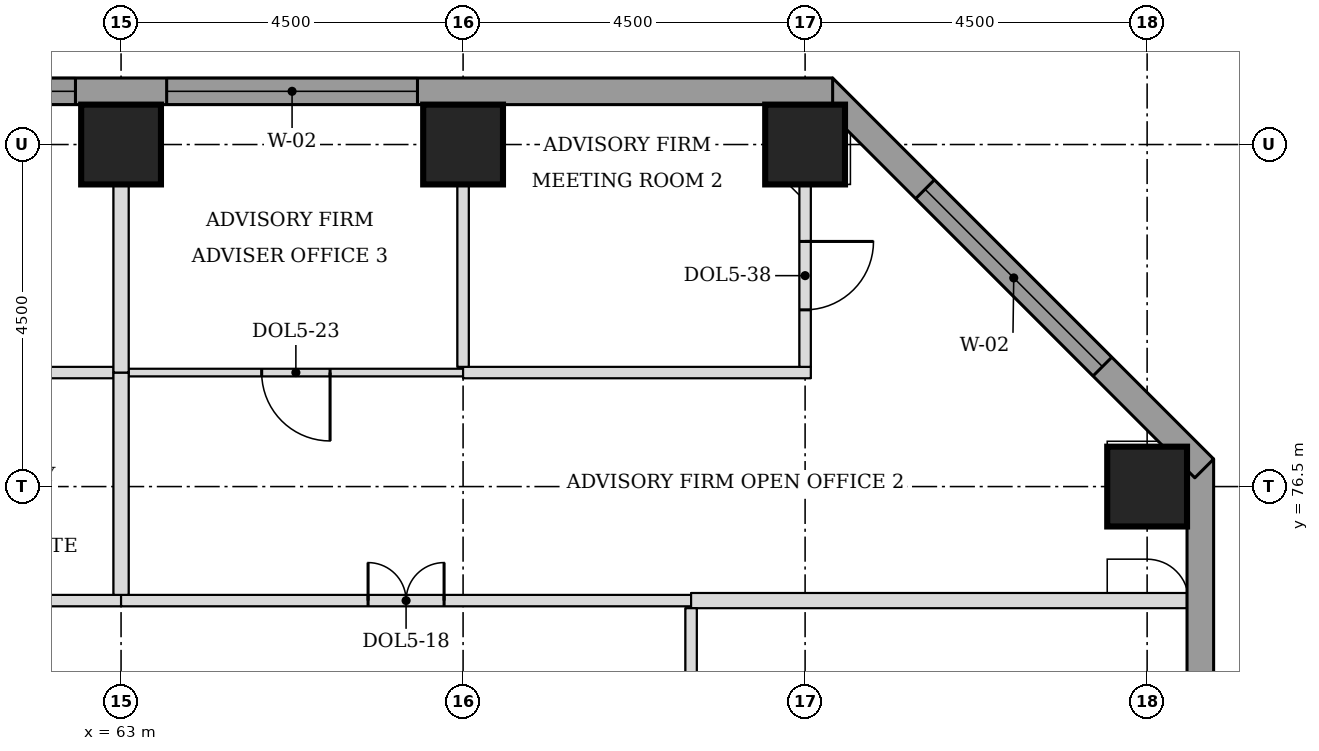
"""IFC4 building model, lengths in metres.
Left out: names, types, materials, properties, quantities, classifications, styles, units other than length and angle.
Written with IfcOpenShell. Run it as: python <this file> out.ifc"""

import sys

from ifc_helpers import new_model, si_unit, direction, frame, frame_2d, origin, origin_2d, place, context, subcontext, project, spatial, rectangle, extrude, element, fill, save


model = new_model("IFC4")
c1 = context("Model", 3, precision=1e-05, world=origin(), true_north=direction((0.0, 1.0)))
c2 = subcontext(c1, "Body", "Model", "MODEL_VIEW")
j1 = project(units=[si_unit("LENGTHUNIT", "METRE"), si_unit("PLANEANGLEUNIT", "RADIAN")], contexts=[c1])
p1 = place(None, origin())
s1 = spatial("IfcSite", under=j1, at=p1, CompositionType="ELEMENT")
p2 = place(p1, origin())
s2 = spatial("IfcBuilding", under=s1, at=p2, CompositionType="ELEMENT")
p3 = place(p2, frame((0.0, 0.0, 108.5)))
s3 = spatial("IfcBuildingStorey", under=s2, at=p3, CompositionType="ELEMENT", Elevation=108.5)
for number, where, z_axis, x_axis in (
    (1, (76.5, 76.5, 0.0), (0.0, 0.0, 1.0), (1.0, 0.0, 0.0)),
    (2, (63.0, 81.0, 0.0), (0.0, 0.0, 1.0), (1.0, 0.0, 0.0)),
    (3, (67.5, 81.0, 0.0), (0.0, 0.0, 1.0), (1.0, 0.0, 0.0)),
    (4, (72.0, 81.0, 0.0), (0.0, 0.0, 1.0), (1.0, 0.0, 0.0)),
):
    element("IfcColumn", number, at=place(p3, frame(where, z_axis=z_axis, x_axis=x_axis)), inside=s3, PredefinedType="COLUMN", context=c2, shape_type="SweptSolid", body=[
        extrude(rectangle(XDim=1.05, YDim=1.05, at=origin_2d()), origin(), (0.0, 0.0, 1.0), 3.7),
    ])
p4 = place(p3, frame((77.2, 44.638, 0.0), z_axis=(0.0, 0.0, 1.0), x_axis=(0.0, 1.0, 0.0)))
e5 = element("IfcWall", 5, at=p4, inside=s3, PredefinedType="STANDARD", context=c2, shape_type="SweptSolid", body=[
    extrude(rectangle(XDim=32.225, YDim=0.35, at=frame_2d((16.112, 0.0))), origin(), (0.0, 0.0, 1.0), 3.525),
])
p5 = place(p4, frame((5.462, 0.0, 0.9)))
e6 = element("IfcOpeningElement", 6, at=p5, cuts=e5, PredefinedType="OPENING", context=c2, shape_type="SweptSolid", body=[
    extrude(rectangle(XDim=3.3, YDim=1.9, at=frame_2d((1.65, 0.95))), frame((0.0, 0.185, 0.0), z_axis=(0.0, -1.0, 0.0), x_axis=(1.0, 0.0, 0.0)), (0.0, 0.0, 1.0), 0.37),
])
p6 = place(p4, frame((9.962, 0.0, 0.9)))
e7 = element("IfcOpeningElement", 7, at=p6, cuts=e5, PredefinedType="OPENING", context=c2, shape_type="SweptSolid", body=[
    extrude(rectangle(XDim=3.3, YDim=1.9, at=frame_2d((1.65, 0.95))), frame((0.0, 0.185, 0.0), z_axis=(0.0, -1.0, 0.0), x_axis=(1.0, 0.0, 0.0)), (0.0, 0.0, 1.0), 0.37),
])
p7 = place(p4, frame((14.462, 0.0, 0.9)))
e8 = element("IfcOpeningElement", 8, at=p7, cuts=e5, PredefinedType="OPENING", context=c2, shape_type="SweptSolid", body=[
    extrude(rectangle(XDim=3.3, YDim=1.9, at=frame_2d((1.65, 0.95))), frame((0.0, 0.185, 0.0), z_axis=(0.0, -1.0, 0.0), x_axis=(1.0, 0.0, 0.0)), (0.0, 0.0, 1.0), 0.37),
])
p8 = place(p4, frame((18.962, 0.0, 0.9)))
e9 = element("IfcOpeningElement", 9, at=p8, cuts=e5, PredefinedType="OPENING", context=c2, shape_type="SweptSolid", body=[
    extrude(rectangle(XDim=3.3, YDim=1.9, at=frame_2d((1.65, 0.95))), frame((0.0, 0.185, 0.0), z_axis=(0.0, -1.0, 0.0), x_axis=(1.0, 0.0, 0.0)), (0.0, 0.0, 1.0), 0.37),
])
p9 = place(p4, frame((23.462, 0.0, 0.9)))
e10 = element("IfcOpeningElement", 10, at=p9, cuts=e5, PredefinedType="OPENING", context=c2, shape_type="SweptSolid", body=[
    extrude(rectangle(XDim=3.3, YDim=1.9, at=frame_2d((1.65, 0.95))), frame((0.0, 0.185, 0.0), z_axis=(0.0, -1.0, 0.0), x_axis=(1.0, 0.0, 0.0)), (0.0, 0.0, 1.0), 0.37),
])
p10 = place(p3, frame((77.251, 76.739, 0.0), z_axis=(0.0, 0.0, 1.0), x_axis=(-0.707106781187, 0.707106781187, 0.0)))
e11 = element("IfcWall", 11, at=p10, inside=s3, PredefinedType="STANDARD", context=c2, shape_type="SweptSolid", body=[
    extrude(rectangle(XDim=7.089, YDim=0.35, at=frame_2d((3.544, 0.0))), origin(), (0.0, 0.0, 1.0), 3.525),
])
p11 = place(p10, frame((1.894, 0.0, 0.9)))
e12 = element("IfcOpeningElement", 12, at=p11, cuts=e11, PredefinedType="OPENING", context=c2, shape_type="SweptSolid", body=[
    extrude(rectangle(XDim=3.3, YDim=1.9, at=frame_2d((1.65, 0.95))), frame((0.0, 0.185, 0.0), z_axis=(0.0, -1.0, 0.0), x_axis=(1.0, 0.0, 0.0)), (0.0, 0.0, 1.0), 0.37),
])
p12 = place(p3, frame((72.362, 81.7, 0.0), z_axis=(0.0, 0.0, 1.0), x_axis=(-1.0, 0.0, 0.0)))
e13 = element("IfcWall", 13, at=p12, inside=s3, PredefinedType="STANDARD", context=c2, shape_type="SweptSolid", body=[
    extrude(rectangle(XDim=32.225, YDim=0.35, at=frame_2d((16.112, 0.0))), origin(), (0.0, 0.0, 1.0), 3.525),
])
p13 = place(p12, frame((5.462, 0.0, 0.9)))
e14 = element("IfcOpeningElement", 14, at=p13, cuts=e13, PredefinedType="OPENING", context=c2, shape_type="SweptSolid", body=[
    extrude(rectangle(XDim=3.3, YDim=1.9, at=frame_2d((1.65, 0.95))), frame((0.0, 0.185, 0.0), z_axis=(0.0, -1.0, 0.0), x_axis=(1.0, 0.0, 0.0)), (0.0, 0.0, 1.0), 0.37),
])
p14 = place(p12, frame((9.962, 0.0, 0.9)))
e15 = element("IfcOpeningElement", 15, at=p14, cuts=e13, PredefinedType="OPENING", context=c2, shape_type="SweptSolid", body=[
    extrude(rectangle(XDim=3.3, YDim=1.9, at=frame_2d((1.65, 0.95))), frame((0.0, 0.185, 0.0), z_axis=(0.0, -1.0, 0.0), x_axis=(1.0, 0.0, 0.0)), (0.0, 0.0, 1.0), 0.37),
])
p15 = place(p12, frame((14.462, 0.0, 0.9)))
e16 = element("IfcOpeningElement", 16, at=p15, cuts=e13, PredefinedType="OPENING", context=c2, shape_type="SweptSolid", body=[
    extrude(rectangle(XDim=3.3, YDim=1.9, at=frame_2d((1.65, 0.95))), frame((0.0, 0.185, 0.0), z_axis=(0.0, -1.0, 0.0), x_axis=(1.0, 0.0, 0.0)), (0.0, 0.0, 1.0), 0.37),
])
p16 = place(p12, frame((18.962, 0.0, 0.9)))
e17 = element("IfcOpeningElement", 17, at=p16, cuts=e13, PredefinedType="OPENING", context=c2, shape_type="SweptSolid", body=[
    extrude(rectangle(XDim=3.3, YDim=1.9, at=frame_2d((1.65, 0.95))), frame((0.0, 0.185, 0.0), z_axis=(0.0, -1.0, 0.0), x_axis=(1.0, 0.0, 0.0)), (0.0, 0.0, 1.0), 0.37),
])
p17 = place(p12, frame((23.462, 0.0, 0.9)))
e18 = element("IfcOpeningElement", 18, at=p17, cuts=e13, PredefinedType="OPENING", context=c2, shape_type="SweptSolid", body=[
    extrude(rectangle(XDim=3.3, YDim=1.9, at=frame_2d((1.65, 0.95))), frame((0.0, 0.185, 0.0), z_axis=(0.0, -1.0, 0.0), x_axis=(1.0, 0.0, 0.0)), (0.0, 0.0, 1.0), 0.37),
])
p18 = place(p3, frame((60.0, 75.0, 0.0), z_axis=(0.0, 0.0, 1.0), x_axis=(1.0, 0.0, 0.0)))
e19 = element("IfcWall", 19, at=p18, inside=s3, PredefinedType="PARTITIONING", context=c2, shape_type="SweptSolid", body=[
    extrude(rectangle(XDim=3.0, YDim=0.15, at=frame_2d((1.5, 0.0))), origin(), (0.0, 0.0, 1.0), 3.55),
])
p19 = place(p3, frame((63.0, 75.0, 0.0), z_axis=(0.0, 0.0, 1.0), x_axis=(1.0, 0.0, 0.0)))
e20 = element("IfcWall", 20, at=p19, inside=s3, PredefinedType="PARTITIONING", context=c2, shape_type="SweptSolid", body=[
    extrude(rectangle(XDim=7.5, YDim=0.15, at=frame_2d((3.75, 0.0))), origin(), (0.0, 0.0, 1.0), 3.55),
])
p20 = place(p19, frame((3.25, 0.0, 0.0)))
e21 = element("IfcOpeningElement", 21, at=p20, cuts=e20, PredefinedType="OPENING", context=c2, shape_type="SweptSolid", body=[
    extrude(rectangle(XDim=1.0, YDim=2.1, at=frame_2d((0.5, 1.05))), frame((0.0, 0.085, 0.0), z_axis=(0.0, -1.0, 0.0), x_axis=(1.0, 0.0, 0.0)), (0.0, 0.0, 1.0), 0.17),
])
p21 = place(p3, frame((70.5, 75.0, 0.0), z_axis=(0.0, 0.0, 1.0), x_axis=(1.0, 0.0, 0.0)))
e22 = element("IfcWall", 22, at=p21, inside=s3, PredefinedType="PARTITIONING", context=c2, shape_type="SweptSolid", body=[
    extrude(rectangle(XDim=6.525, YDim=0.2, at=frame_2d((3.262, 0.0))), origin(), (0.0, 0.0, 1.0), 3.55),
])
p22 = place(p3, frame((59.925, 78.0, 0.0), z_axis=(0.0, 0.0, 1.0), x_axis=(1.0, 0.0, 0.0)))
e23 = element("IfcWall", 23, at=p22, inside=s3, PredefinedType="PARTITIONING", context=c2, shape_type="SweptSolid", body=[
    extrude(rectangle(XDim=2.975, YDim=0.15, at=frame_2d((1.487, 0.0))), origin(), (0.0, 0.0, 1.0), 3.55),
])
p23 = place(p22, frame((1.05, 0.0, 0.0)))
e24 = element("IfcOpeningElement", 24, at=p23, cuts=e23, PredefinedType="OPENING", context=c2, shape_type="SweptSolid", body=[
    extrude(rectangle(XDim=0.9, YDim=2.1, at=frame_2d((0.45, 1.05))), frame((0.0, 0.085, 0.0), z_axis=(0.0, -1.0, 0.0), x_axis=(1.0, 0.0, 0.0)), (0.0, 0.0, 1.0), 0.17),
])
p24 = place(p3, frame((63.1, 78.0, 0.0), z_axis=(0.0, 0.0, 1.0), x_axis=(1.0, 0.0, 0.0)))
e25 = element("IfcWall", 25, at=p24, inside=s3, PredefinedType="PARTITIONING", context=c2, shape_type="SweptSolid", body=[
    extrude(rectangle(XDim=4.4, YDim=0.1, at=frame_2d((2.2, 0.0))), origin(), (0.0, 0.0, 1.0), 3.55),
])
p25 = place(p24, frame((1.75, 0.0, 0.0)))
e26 = element("IfcOpeningElement", 26, at=p25, cuts=e25, PredefinedType="OPENING", context=c2, shape_type="SweptSolid", body=[
    extrude(rectangle(XDim=0.9, YDim=2.1, at=frame_2d((0.45, 1.05))), frame((0.0, 0.06, 0.0), z_axis=(0.0, -1.0, 0.0), x_axis=(1.0, 0.0, 0.0)), (0.0, 0.0, 1.0), 0.12),
])
p26 = place(p3, frame((67.5, 78.0, 0.0), z_axis=(0.0, 0.0, 1.0), x_axis=(1.0, 0.0, 0.0)))
e27 = element("IfcWall", 27, at=p26, inside=s3, PredefinedType="PARTITIONING", context=c2, shape_type="SweptSolid", body=[
    extrude(rectangle(XDim=4.575, YDim=0.15, at=frame_2d((2.288, 0.0))), origin(), (0.0, 0.0, 1.0), 3.55),
])
p27 = place(p3, frame((70.5, 57.0, 0.0), z_axis=(0.0, 0.0, 1.0), x_axis=(0.0, 1.0, 0.0)))
e28 = element("IfcWall", 28, at=p27, inside=s3, PredefinedType="PARTITIONING", context=c2, shape_type="SweptSolid", body=[
    extrude(rectangle(XDim=17.9, YDim=0.15, at=frame_2d((8.95, 0.0))), origin(), (0.0, 0.0, 1.0), 3.55),
])
p28 = place(p27, frame((8.45, 0.0, 0.0)))
e29 = element("IfcOpeningElement", 29, at=p28, cuts=e28, PredefinedType="OPENING", context=c2, shape_type="SweptSolid", body=[
    extrude(rectangle(XDim=1.0, YDim=2.1, at=frame_2d((0.5, 1.05))), frame((0.0, 0.085, 0.0), z_axis=(0.0, -1.0, 0.0), x_axis=(1.0, 0.0, 0.0)), (0.0, 0.0, 1.0), 0.17),
])
p29 = place(p3, frame((63.0, 75.075, 0.0), z_axis=(0.0, 0.0, 1.0), x_axis=(0.0, 1.0, 0.0)))
e30 = element("IfcWall", 30, at=p29, inside=s3, PredefinedType="PARTITIONING", context=c2, shape_type="SweptSolid", body=[
    extrude(rectangle(XDim=2.925, YDim=0.2, at=frame_2d((1.462, 0.0))), origin(), (0.0, 0.0, 1.0), 3.55),
])
p30 = place(p3, frame((63.0, 78.0, 0.0), z_axis=(0.0, 0.0, 1.0), x_axis=(0.0, 1.0, 0.0)))
e31 = element("IfcWall", 31, at=p30, inside=s3, PredefinedType="PARTITIONING", context=c2, shape_type="SweptSolid", body=[
    extrude(rectangle(XDim=3.525, YDim=0.2, at=frame_2d((1.762, 0.0))), origin(), (0.0, 0.0, 1.0), 3.55),
])
p31 = place(p3, frame((67.5, 78.075, 0.0), z_axis=(0.0, 0.0, 1.0), x_axis=(0.0, 1.0, 0.0)))
e32 = element("IfcWall", 32, at=p31, inside=s3, PredefinedType="PARTITIONING", context=c2, shape_type="SweptSolid", body=[
    extrude(rectangle(XDim=3.45, YDim=0.15, at=frame_2d((1.725, 0.0))), origin(), (0.0, 0.0, 1.0), 3.55),
])
p32 = place(p3, frame((72.0, 78.075, 0.0), z_axis=(0.0, 0.0, 1.0), x_axis=(0.0, 1.0, 0.0)))
e33 = element("IfcWall", 33, at=p32, inside=s3, PredefinedType="PARTITIONING", context=c2, shape_type="SweptSolid", body=[
    extrude(rectangle(XDim=2.4, YDim=0.15, at=frame_2d((1.2, 0.0))), origin(), (0.0, 0.0, 1.0), 3.55),
])
p33 = place(p32, frame((0.75, 0.0, 0.0)))
e34 = element("IfcOpeningElement", 34, at=p33, cuts=e33, PredefinedType="OPENING", context=c2, shape_type="SweptSolid", body=[
    extrude(rectangle(XDim=0.9, YDim=2.1, at=frame_2d((0.45, 1.05))), frame((0.0, 0.085, 0.0), z_axis=(0.0, -1.0, 0.0), x_axis=(1.0, 0.0, 0.0)), (0.0, 0.0, 1.0), 0.17),
])
p34 = place(p11, origin())
e35 = element("IfcWindow", 35, at=p34, inside=s3, PartitioningType="SINGLE_PANEL", PredefinedType="WINDOW", context=c2, shape_type="SweptSolid", body=[
    extrude(rectangle(XDim=3.3, YDim=1.9, at=frame_2d((1.65, 0.95))), frame((0.0, 0.085, 0.0), z_axis=(0.0, -1.0, 0.0), x_axis=(1.0, 0.0, 0.0)), (0.0, 0.0, 1.0), 0.06),
])
fill(e12, e35)
p35 = place(p13, origin())
e36 = element("IfcWindow", 36, at=p35, inside=s3, PartitioningType="SINGLE_PANEL", PredefinedType="WINDOW", context=c2, shape_type="SweptSolid", body=[
    extrude(rectangle(XDim=3.3, YDim=1.9, at=frame_2d((1.65, 0.95))), frame((0.0, 0.085, 0.0), z_axis=(0.0, -1.0, 0.0), x_axis=(1.0, 0.0, 0.0)), (0.0, 0.0, 1.0), 0.06),
])
fill(e14, e36)
p36 = place(p14, origin())
e37 = element("IfcWindow", 37, at=p36, inside=s3, PartitioningType="SINGLE_PANEL", PredefinedType="WINDOW", context=c2, shape_type="SweptSolid", body=[
    extrude(rectangle(XDim=3.3, YDim=1.9, at=frame_2d((1.65, 0.95))), frame((0.0, 0.085, 0.0), z_axis=(0.0, -1.0, 0.0), x_axis=(1.0, 0.0, 0.0)), (0.0, 0.0, 1.0), 0.06),
])
fill(e15, e37)
p37 = place(p20, origin())
e38 = element("IfcDoor", 38, at=p37, inside=s3, OperationType="DOUBLE_DOOR_SINGLE_SWING", PredefinedType="DOOR", context=c2, shape_type="SweptSolid", body=[
    extrude(rectangle(XDim=1.0, YDim=2.1, at=frame_2d((0.5, 1.05))), frame((0.0, 0.025, 0.0), z_axis=(0.0, -1.0, 0.0), x_axis=(1.0, 0.0, 0.0)), (0.0, 0.0, 1.0), 0.05),
])
fill(e21, e38)
p38 = place(p25, frame((0.9, 0.0, 0.0), z_axis=(0.0, 0.0, 1.0), x_axis=(-1.0, 0.0, 0.0)))
e39 = element("IfcDoor", 39, at=p38, inside=s3, OperationType="SINGLE_SWING_LEFT", PredefinedType="DOOR", context=c2, shape_type="SweptSolid", body=[
    extrude(rectangle(XDim=0.9, YDim=2.1, at=frame_2d((0.45, 1.05))), frame((0.0, 0.025, 0.0), z_axis=(0.0, -1.0, 0.0), x_axis=(1.0, 0.0, 0.0)), (0.0, 0.0, 1.0), 0.05),
])
fill(e26, e39)
p39 = place(p33, frame((0.9, 0.0, 0.0), z_axis=(0.0, 0.0, 1.0), x_axis=(-1.0, 0.0, 0.0)))
e40 = element("IfcDoor", 40, at=p39, inside=s3, OperationType="SINGLE_SWING_LEFT", PredefinedType="DOOR", context=c2, shape_type="SweptSolid", body=[
    extrude(rectangle(XDim=0.9, YDim=2.1, at=frame_2d((0.45, 1.05))), frame((0.0, 0.025, 0.0), z_axis=(0.0, -1.0, 0.0), x_axis=(1.0, 0.0, 0.0)), (0.0, 0.0, 1.0), 0.05),
])
fill(e34, e40)
save(model, sys.argv[1])
